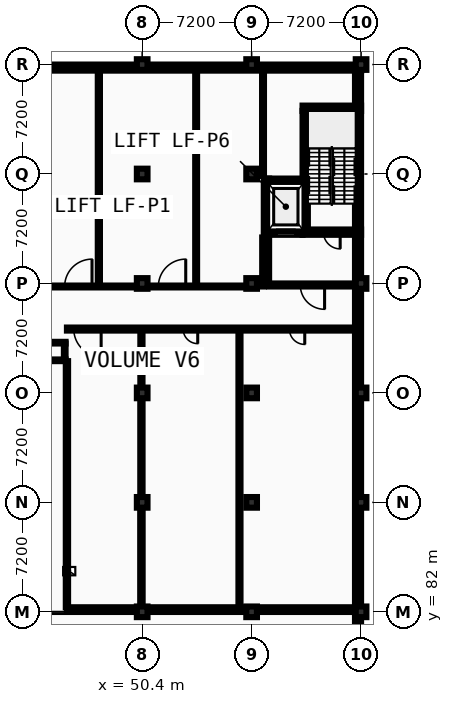
"""IFC4 building model, lengths in metres.
Left out: names, types, materials, properties, quantities, classifications, styles, units other than length and angle.
Written with IfcOpenShell. Run it as: python <this file> out.ifc"""

import sys

from ifc_helpers import new_model, si_unit, direction, frame, frame_2d, origin, origin_2d, place, context, subcontext, project, spatial, rectangle, extrude, element, fill, save


model = new_model("IFC4")
c1 = context("Model", 3, precision=1e-05, world=origin(), true_north=direction((0.0, 1.0)))
c2 = subcontext(c1, "Body", "Model", "MODEL_VIEW")
j1 = project(units=[si_unit("LENGTHUNIT", "METRE"), si_unit("PLANEANGLEUNIT", "RADIAN")], contexts=[c1])
p1 = place(None, origin())
s1 = spatial("IfcSite", under=j1, at=p1, CompositionType="ELEMENT")
p2 = place(p1, origin())
s2 = spatial("IfcBuilding", under=s1, at=p2, CompositionType="ELEMENT")
p3 = place(p2, frame((0.0, 0.0, -4.8)))
s3 = spatial("IfcBuildingStorey", under=s2, at=p3, CompositionType="ELEMENT", Elevation=-4.8)
for number, where, z_axis, x_axis in (
    (1, (50.4, 82.0, 0.0), (0.0, 0.0, 1.0), (1.0, 0.0, 0.0)),
    (2, (50.4, 89.2, 0.0), (0.0, 0.0, 1.0), (1.0, 0.0, 0.0)),
    (3, (50.4, 96.4, 0.0), (0.0, 0.0, 1.0), (1.0, 0.0, 0.0)),
    (4, (50.4, 103.6, 0.0), (0.0, 0.0, 1.0), (1.0, 0.0, 0.0)),
    (5, (50.4, 110.8, 0.0), (0.0, 0.0, 1.0), (1.0, 0.0, 0.0)),
    (6, (50.4, 118.0, 0.0), (0.0, 0.0, 1.0), (1.0, 0.0, 0.0)),
    (7, (57.6, 82.0, 0.0), (0.0, 0.0, 1.0), (1.0, 0.0, 0.0)),
    (8, (57.6, 89.2, 0.0), (0.0, 0.0, 1.0), (1.0, 0.0, 0.0)),
    (9, (57.6, 96.4, 0.0), (0.0, 0.0, 1.0), (1.0, 0.0, 0.0)),
    (10, (57.6, 103.6, 0.0), (0.0, 0.0, 1.0), (1.0, 0.0, 0.0)),
    (11, (57.6, 110.8, 0.0), (0.0, 0.0, 1.0), (1.0, 0.0, 0.0)),
    (12, (57.6, 118.0, 0.0), (0.0, 0.0, 1.0), (1.0, 0.0, 0.0)),
    (13, (64.8, 82.0, 0.0), (0.0, 0.0, 1.0), (1.0, 0.0, 0.0)),
    (14, (64.8, 89.2, 0.0), (0.0, 0.0, 1.0), (1.0, 0.0, 0.0)),
    (15, (64.8, 96.4, 0.0), (0.0, 0.0, 1.0), (1.0, 0.0, 0.0)),
    (16, (64.8, 103.6, 0.0), (0.0, 0.0, 1.0), (1.0, 0.0, 0.0)),
    (17, (64.8, 118.0, 0.0), (0.0, 0.0, 1.0), (1.0, 0.0, 0.0)),
):
    element("IfcColumn", number, at=place(p3, frame(where, z_axis=z_axis, x_axis=x_axis)), inside=s3, PredefinedType="COLUMN", context=c2, shape_type="SweptSolid", body=[
        extrude(rectangle(XDim=0.7, YDim=0.7, at=origin_2d()), origin(), (0.0, 0.0, 1.0), 4.8),
    ])
p4 = place(p3, frame((64.6, 79.2, 0.0), z_axis=(0.0, 0.0, 1.0), x_axis=(0.0, 1.0, 0.0)))
e18 = element("IfcWall", 18, at=p4, inside=s3, PredefinedType="USERDEFINED", context=c2, shape_type="SweptSolid", body=[
    extrude(rectangle(XDim=38.4, YDim=0.4, at=frame_2d((19.2, 0.0))), origin(), (0.0, 0.0, 1.0), 4.545),
])
p5 = place(p3, frame((64.8, 117.8, 0.0), z_axis=(0.0, 0.0, 1.0), x_axis=(-1.0, 0.0, 0.0)))
e19 = element("IfcWall", 19, at=p5, inside=s3, PredefinedType="USERDEFINED", context=c2, shape_type="SweptSolid", body=[
    extrude(rectangle(XDim=28.8, YDim=0.4, at=frame_2d((14.4, 0.0))), origin(), (0.0, 0.0, 1.0), 4.545),
])
p6 = place(p3, frame((60.95, 106.975, 0.0), z_axis=(0.0, 0.0, 1.0), x_axis=(1.0, 0.0, 0.0)))
e20 = element("IfcWall", 20, at=p6, inside=s3, PredefinedType="SHEAR", context=c2, shape_type="SweptSolid", body=[
    extrude(rectangle(XDim=3.85, YDim=0.35, at=frame_2d((1.925, 0.0))), origin(), (0.0, 0.0, 1.0), 4.545),
])
p7 = place(p6, frame((1.375, 0.0, 0.0)))
e21 = element("IfcOpeningElement", 21, at=p7, cuts=e20, PredefinedType="OPENING", context=c2, shape_type="SweptSolid", body=[
    extrude(rectangle(XDim=1.1, YDim=2.15, at=frame_2d((0.55, 1.075))), frame((0.0, 0.185, 0.0), z_axis=(0.0, -1.0, 0.0), x_axis=(1.0, 0.0, 0.0)), (0.0, 0.0, 1.0), 0.37),
])
p8 = place(p3, frame((60.95, 115.125, 0.0), z_axis=(0.0, 0.0, 1.0), x_axis=(1.0, 0.0, 0.0)))
e22 = element("IfcWall", 22, at=p8, inside=s3, PredefinedType="SHEAR", context=c2, shape_type="SweptSolid", body=[
    extrude(rectangle(XDim=3.85, YDim=0.35, at=frame_2d((1.925, 0.0))), origin(), (0.0, 0.0, 1.0), 4.545),
])
p9 = place(p3, frame((61.125, 107.15, 0.0), z_axis=(0.0, 0.0, 1.0), x_axis=(0.0, 1.0, 0.0)))
e23 = element("IfcWall", 23, at=p9, inside=s3, PredefinedType="SHEAR", context=c2, shape_type="SweptSolid", body=[
    extrude(rectangle(XDim=7.8, YDim=0.35, at=frame_2d((3.9, 0.0))), origin(), (0.0, 0.0, 1.0), 4.545),
])
p10 = place(p3, frame((58.75, 106.975, 0.0), z_axis=(0.0, 0.0, 1.0), x_axis=(1.0, 0.0, 0.0)))
e24 = element("IfcWall", 24, at=p10, inside=s3, PredefinedType="SHEAR", context=c2, shape_type="SweptSolid", body=[
    extrude(rectangle(XDim=2.2, YDim=0.35, at=frame_2d((1.1, 0.0))), origin(), (0.0, 0.0, 1.0), 4.545),
])
p11 = place(p10, frame((0.5, 0.0, 0.0)))
e25 = element("IfcOpeningElement", 25, at=p11, cuts=e24, PredefinedType="OPENING", context=c2, shape_type="SweptSolid", body=[
    extrude(rectangle(XDim=1.2, YDim=2.2, at=frame_2d((0.6, 1.1))), frame((0.0, 0.185, 0.0), z_axis=(0.0, -1.0, 0.0), x_axis=(1.0, 0.0, 0.0)), (0.0, 0.0, 1.0), 0.37),
])
p12 = place(p3, frame((58.75, 110.325, 0.0), z_axis=(0.0, 0.0, 1.0), x_axis=(1.0, 0.0, 0.0)))
e26 = element("IfcWall", 26, at=p12, inside=s3, PredefinedType="SHEAR", context=c2, shape_type="SweptSolid", body=[
    extrude(rectangle(XDim=2.2, YDim=0.35, at=frame_2d((1.1, 0.0))), origin(), (0.0, 0.0, 1.0), 4.545),
])
p13 = place(p3, frame((58.575, 106.8, 0.0), z_axis=(0.0, 0.0, 1.0), x_axis=(0.0, 1.0, 0.0)))
e27 = element("IfcWall", 27, at=p13, inside=s3, PredefinedType="SHEAR", context=c2, shape_type="SweptSolid", body=[
    extrude(rectangle(XDim=3.7, YDim=0.35, at=frame_2d((1.85, 0.0))), origin(), (0.0, 0.0, 1.0), 4.545),
])
p14 = place(p3, frame((58.75, 103.5, 0.0), z_axis=(0.0, 0.0, 1.0), x_axis=(1.0, 0.0, 0.0)))
e28 = element("IfcWall", 28, at=p14, inside=s3, PredefinedType="PARTITIONING", context=c2, shape_type="SweptSolid", body=[
    extrude(rectangle(XDim=5.7, YDim=0.2, at=frame_2d((2.85, 0.0))), origin(), (0.0, 0.0, 1.0), 4.095),
])
p15 = place(p14, frame((2.05, 0.0, 0.0)))
e29 = element("IfcOpeningElement", 29, at=p15, cuts=e28, PredefinedType="OPENING", context=c2, shape_type="SweptSolid", body=[
    extrude(rectangle(XDim=1.6, YDim=2.2, at=frame_2d((0.8, 1.1))), frame((0.0, 0.11, 0.0), z_axis=(0.0, -1.0, 0.0), x_axis=(1.0, 0.0, 0.0)), (0.0, 0.0, 1.0), 0.22),
])
p16 = place(p3, frame((58.65, 103.6, 0.0), z_axis=(0.0, 0.0, 1.0), x_axis=(0.0, 1.0, 0.0)))
e30 = element("IfcWall", 30, at=p16, inside=s3, PredefinedType="PARTITIONING", context=c2, shape_type="SweptSolid", body=[
    extrude(rectangle(XDim=3.2, YDim=0.2, at=frame_2d((1.6, 0.0))), origin(), (0.0, 0.0, 1.0), 4.545),
])
for number, where, z_axis, x_axis in (
    (31, (44.09, 98.545, 0.0), (0.0, 0.0, 1.0), (1.0, 0.0, 0.0)),
    (32, (44.09, 99.705, 0.0), (0.0, 0.0, 1.0), (1.0, 0.0, 0.0)),
):
    element("IfcWall", number, at=place(p3, frame(where, z_axis=z_axis, x_axis=x_axis)), inside=s3, PredefinedType="PARTITIONING", context=c2, shape_type="SweptSolid", body=[
        extrude(rectangle(XDim=1.27, YDim=0.11, at=frame_2d((0.635, 0.0))), origin(), (0.0, 0.0, 1.0), 4.54),
    ])
p17 = place(p3, frame((45.305, 98.6, 0.0), z_axis=(0.0, 0.0, 1.0), x_axis=(0.0, 1.0, 0.0)))
e33 = element("IfcWall", 33, at=p17, inside=s3, PredefinedType="PARTITIONING", context=c2, shape_type="SweptSolid", body=[
    extrude(rectangle(XDim=1.05, YDim=0.11, at=frame_2d((0.525, 0.0))), origin(), (0.0, 0.0, 1.0), 4.54),
])
p18 = place(p3, frame((45.45, 82.2, 0.0), z_axis=(0.0, 0.0, 1.0), x_axis=(1.0, 0.0, 0.0)))
e34 = element("IfcWall", 34, at=p18, inside=s3, PredefinedType="PARTITIONING", context=c2, shape_type="SweptSolid", body=[
    extrude(rectangle(XDim=4.57, YDim=0.2, at=frame_2d((2.285, 0.0))), origin(), (0.0, 0.0, 1.0), 4.095),
])
p19 = place(p3, frame((50.78, 82.2, 0.0), z_axis=(0.0, 0.0, 1.0), x_axis=(1.0, 0.0, 0.0)))
e35 = element("IfcWall", 35, at=p19, inside=s3, PredefinedType="PARTITIONING", context=c2, shape_type="SweptSolid", body=[
    extrude(rectangle(XDim=6.44, YDim=0.2, at=frame_2d((3.22, 0.0))), origin(), (0.0, 0.0, 1.0), 4.095),
])
p20 = place(p3, frame((57.98, 82.2, 0.0), z_axis=(0.0, 0.0, 1.0), x_axis=(1.0, 0.0, 0.0)))
e36 = element("IfcWall", 36, at=p20, inside=s3, PredefinedType="PARTITIONING", context=c2, shape_type="SweptSolid", body=[
    extrude(rectangle(XDim=6.4, YDim=0.2, at=frame_2d((3.2, 0.0))), origin(), (0.0, 0.0, 1.0), 4.095),
])
p21 = place(p3, frame((45.45, 100.6, 0.0), z_axis=(0.0, 0.0, 1.0), x_axis=(1.0, 0.0, 0.0)))
e37 = element("IfcWall", 37, at=p21, inside=s3, PredefinedType="PARTITIONING", context=c2, shape_type="SweptSolid", body=[
    extrude(rectangle(XDim=18.93, YDim=0.2, at=frame_2d((9.465, 0.0))), origin(), (0.0, 0.0, 1.0), 4.545),
])
p22 = place(p21, frame((0.45, 0.0, 0.0)))
e38 = element("IfcOpeningElement", 38, at=p22, cuts=e37, PredefinedType="OPENING", context=c2, shape_type="SweptSolid", body=[
    extrude(rectangle(XDim=1.8, YDim=2.3, at=frame_2d((0.9, 1.15))), frame((0.0, 0.11, 0.0), z_axis=(0.0, -1.0, 0.0), x_axis=(1.0, 0.0, 0.0)), (0.0, 0.0, 1.0), 0.22),
])
p23 = place(p21, frame((7.646, 0.0, 0.0)))
e39 = element("IfcOpeningElement", 39, at=p23, cuts=e37, PredefinedType="OPENING", context=c2, shape_type="SweptSolid", body=[
    extrude(rectangle(XDim=0.958, YDim=2.068, at=frame_2d((0.479, 1.034))), frame((0.0, 0.11, 0.0), z_axis=(0.0, -1.0, 0.0), x_axis=(1.0, 0.0, 0.0)), (0.0, 0.0, 1.0), 0.22),
])
p24 = place(p21, frame((14.635, 0.0, 0.0)))
e40 = element("IfcOpeningElement", 40, at=p24, cuts=e37, PredefinedType="OPENING", context=c2, shape_type="SweptSolid", body=[
    extrude(rectangle(XDim=1.01, YDim=2.068, at=frame_2d((0.505, 1.034))), frame((0.0, 0.11, 0.0), z_axis=(0.0, -1.0, 0.0), x_axis=(1.0, 0.0, 0.0)), (0.0, 0.0, 1.0), 0.22),
])
p25 = place(p3, frame((43.58, 103.4, 0.0), z_axis=(0.0, 0.0, 1.0), x_axis=(1.0, 0.0, 0.0)))
e41 = element("IfcWall", 41, at=p25, inside=s3, PredefinedType="PARTITIONING", context=c2, shape_type="SweptSolid", body=[
    extrude(rectangle(XDim=6.44, YDim=0.125, at=frame_2d((3.22, 0.0))), origin(), (0.0, 0.0, 1.0), 4.095),
])
p26 = place(p25, frame((1.72, 0.0, 0.0)))
e42 = element("IfcOpeningElement", 42, at=p26, cuts=e41, PredefinedType="OPENING", context=c2, shape_type="SweptSolid", body=[
    extrude(rectangle(XDim=1.8, YDim=2.3, at=frame_2d((0.9, 1.15))), frame((0.0, 0.073, 0.0), z_axis=(0.0, -1.0, 0.0), x_axis=(1.0, 0.0, 0.0)), (0.0, 0.0, 1.0), 0.145),
])
p27 = place(p3, frame((50.78, 103.4, 0.0), z_axis=(0.0, 0.0, 1.0), x_axis=(1.0, 0.0, 0.0)))
e43 = element("IfcWall", 43, at=p27, inside=s3, PredefinedType="PARTITIONING", context=c2, shape_type="SweptSolid", body=[
    extrude(rectangle(XDim=6.44, YDim=0.125, at=frame_2d((3.22, 0.0))), origin(), (0.0, 0.0, 1.0), 4.095),
])
p28 = place(p27, frame((3.62, 0.0, 0.0)))
e44 = element("IfcOpeningElement", 44, at=p28, cuts=e43, PredefinedType="OPENING", context=c2, shape_type="SweptSolid", body=[
    extrude(rectangle(XDim=1.0, YDim=2.1, at=frame_2d((0.5, 1.05))), frame((0.0, 0.073, 0.0), z_axis=(0.0, -1.0, 0.0), x_axis=(1.0, 0.0, 0.0)), (0.0, 0.0, 1.0), 0.145),
])
p29 = place(p27, frame((0.685, 0.0, 0.0)))
e45 = element("IfcOpeningElement", 45, at=p29, cuts=e43, PredefinedType="OPENING", context=c2, shape_type="SweptSolid", body=[
    extrude(rectangle(XDim=1.8, YDim=2.3, at=frame_2d((0.9, 1.15))), frame((0.0, 0.073, 0.0), z_axis=(0.0, -1.0, 0.0), x_axis=(1.0, 0.0, 0.0)), (0.0, 0.0, 1.0), 0.145),
])
p30 = place(p3, frame((45.45, 82.3, 0.0), z_axis=(0.0, 0.0, 1.0), x_axis=(0.0, 1.0, 0.0)))
e46 = element("IfcWall", 46, at=p30, inside=s3, PredefinedType="PARTITIONING", context=c2, shape_type="SweptSolid", body=[
    extrude(rectangle(XDim=16.19, YDim=0.15, at=frame_2d((8.095, 0.0))), origin(), (0.0, 0.0, 1.0), 4.235),
])
p31 = place(p3, frame((47.55, 103.462, 0.0), z_axis=(0.0, 0.0, 1.0), x_axis=(0.0, 1.0, 0.0)))
e47 = element("IfcWall", 47, at=p31, inside=s3, PredefinedType="PARTITIONING", context=c2, shape_type="SweptSolid", body=[
    extrude(rectangle(XDim=14.138, YDim=0.142, at=frame_2d((7.069, 0.0))), origin(), (0.0, 0.0, 1.0), 4.545),
])
p32 = place(p3, frame((50.35, 82.38, 0.0), z_axis=(0.0, 0.0, 1.0), x_axis=(0.0, 1.0, 0.0)))
e48 = element("IfcWall", 48, at=p32, inside=s3, PredefinedType="PARTITIONING", context=c2, shape_type="SweptSolid", body=[
    extrude(rectangle(XDim=6.44, YDim=0.16, at=frame_2d((3.22, 0.0))), origin(), (0.0, 0.0, 1.0), 4.245),
])
p33 = place(p3, frame((50.35, 89.58, 0.0), z_axis=(0.0, 0.0, 1.0), x_axis=(0.0, 1.0, 0.0)))
e49 = element("IfcWall", 49, at=p33, inside=s3, PredefinedType="PARTITIONING", context=c2, shape_type="SweptSolid", body=[
    extrude(rectangle(XDim=6.44, YDim=0.15, at=frame_2d((3.22, 0.0))), origin(), (0.0, 0.0, 1.0), 4.245),
])
p34 = place(p3, frame((50.35, 96.78, 0.0), z_axis=(0.0, 0.0, 1.0), x_axis=(0.0, 1.0, 0.0)))
e50 = element("IfcWall", 50, at=p34, inside=s3, PredefinedType="PARTITIONING", context=c2, shape_type="SweptSolid", body=[
    extrude(rectangle(XDim=3.72, YDim=0.142, at=frame_2d((1.86, 0.0))), origin(), (0.0, 0.0, 1.0), 4.245),
])
p35 = place(p3, frame((53.95, 103.462, 0.0), z_axis=(0.0, 0.0, 1.0), x_axis=(0.0, 1.0, 0.0)))
e51 = element("IfcWall", 51, at=p35, inside=s3, PredefinedType="PARTITIONING", context=c2, shape_type="SweptSolid", body=[
    extrude(rectangle(XDim=14.138, YDim=0.125, at=frame_2d((7.069, 0.0))), origin(), (0.0, 0.0, 1.0), 4.545),
])
p36 = place(p3, frame((56.8, 82.3, 0.0), z_axis=(0.0, 0.0, 1.0), x_axis=(0.0, 1.0, 0.0)))
e52 = element("IfcWall", 52, at=p36, inside=s3, PredefinedType="PARTITIONING", context=c2, shape_type="SweptSolid", body=[
    extrude(rectangle(XDim=18.2, YDim=0.135, at=frame_2d((9.1, 0.0))), origin(), (0.0, 0.0, 1.0), 4.545),
])
p37 = place(p3, frame((58.35, 103.4, 0.0), z_axis=(0.0, 0.0, 1.0), x_axis=(0.0, 1.0, 0.0)))
e53 = element("IfcWall", 53, at=p37, inside=s3, PredefinedType="PARTITIONING", context=c2, shape_type="SweptSolid", body=[
    extrude(rectangle(XDim=3.225, YDim=0.11, at=frame_2d((1.613, 0.0))), origin(), (0.0, 0.0, 1.0), 4.545),
])
p38 = place(p3, frame((58.35, 110.675, 0.0), z_axis=(0.0, 0.0, 1.0), x_axis=(0.0, 1.0, 0.0)))
e54 = element("IfcWall", 54, at=p38, inside=s3, PredefinedType="PARTITIONING", context=c2, shape_type="SweptSolid", body=[
    extrude(rectangle(XDim=6.925, YDim=0.125, at=frame_2d((3.462, 0.0))), origin(), (0.0, 0.0, 1.0), 4.545),
])
p39 = place(p7, origin())
e55 = element("IfcDoor", 55, at=p39, inside=s3, OperationType="SINGLE_SWING_RIGHT", PredefinedType="DOOR", context=c2, shape_type="SweptSolid", body=[
    extrude(rectangle(XDim=1.1, YDim=2.15, at=frame_2d((0.55, 1.075))), frame((0.0, 0.025, 0.0), z_axis=(0.0, -1.0, 0.0), x_axis=(1.0, 0.0, 0.0)), (0.0, 0.0, 1.0), 0.05),
])
fill(e21, e55)
p40 = place(p11, origin())
e56 = element("IfcDoor", 56, at=p40, inside=s3, OperationType="SLIDING_TO_RIGHT", PredefinedType="DOOR", context=c2, shape_type="SweptSolid", body=[
    extrude(rectangle(XDim=1.2, YDim=2.2, at=frame_2d((0.6, 1.1))), frame((0.0, 0.025, 0.0), z_axis=(0.0, -1.0, 0.0), x_axis=(1.0, 0.0, 0.0)), (0.0, 0.0, 1.0), 0.05),
])
fill(e25, e56)
p41 = place(p15, origin())
e57 = element("IfcDoor", 57, at=p41, inside=s3, OperationType="DOUBLE_DOOR_SINGLE_SWING", PredefinedType="DOOR", context=c2, shape_type="SweptSolid", body=[
    extrude(rectangle(XDim=1.6, YDim=2.2, at=frame_2d((0.8, 1.1))), frame((0.0, 0.025, 0.0), z_axis=(0.0, -1.0, 0.0), x_axis=(1.0, 0.0, 0.0)), (0.0, 0.0, 1.0), 0.05),
])
fill(e29, e57)
p42 = place(p28, frame((1.0, 0.0, 0.0), z_axis=(0.0, 0.0, 1.0), x_axis=(-1.0, 0.0, 0.0)))
e58 = element("IfcDoor", 58, at=p42, inside=s3, OperationType="SLIDING_TO_LEFT", PredefinedType="DOOR", context=c2, shape_type="SweptSolid", body=[
    extrude(rectangle(XDim=1.0, YDim=2.1, at=frame_2d((0.5, 1.05))), frame((0.0, 0.025, 0.0), z_axis=(0.0, -1.0, 0.0), x_axis=(1.0, 0.0, 0.0)), (0.0, 0.0, 1.0), 0.05),
])
fill(e44, e58)
p43 = place(p26, frame((1.8, 0.0, 0.0), z_axis=(0.0, 0.0, 1.0), x_axis=(-1.0, 0.0, 0.0)))
e59 = element("IfcDoor", 59, at=p43, inside=s3, OperationType="DOUBLE_DOOR_SINGLE_SWING", PredefinedType="DOOR", context=c2, shape_type="SweptSolid", body=[
    extrude(rectangle(XDim=1.8, YDim=2.3, at=frame_2d((0.9, 1.15))), frame((0.0, 0.025, 0.0), z_axis=(0.0, -1.0, 0.0), x_axis=(1.0, 0.0, 0.0)), (0.0, 0.0, 1.0), 0.05),
])
fill(e42, e59)
p44 = place(p22, origin())
e60 = element("IfcDoor", 60, at=p44, inside=s3, OperationType="DOUBLE_DOOR_SINGLE_SWING", PredefinedType="DOOR", context=c2, shape_type="SweptSolid", body=[
    extrude(rectangle(XDim=1.8, YDim=2.3, at=frame_2d((0.9, 1.15))), frame((0.0, 0.025, 0.0), z_axis=(0.0, -1.0, 0.0), x_axis=(1.0, 0.0, 0.0)), (0.0, 0.0, 1.0), 0.05),
])
fill(e38, e60)
p45 = place(p29, frame((1.8, 0.0, 0.0), z_axis=(0.0, 0.0, 1.0), x_axis=(-1.0, 0.0, 0.0)))
e61 = element("IfcDoor", 61, at=p45, inside=s3, OperationType="DOUBLE_DOOR_SINGLE_SWING", PredefinedType="DOOR", context=c2, shape_type="SweptSolid", body=[
    extrude(rectangle(XDim=1.8, YDim=2.3, at=frame_2d((0.9, 1.15))), frame((0.0, 0.025, 0.0), z_axis=(0.0, -1.0, 0.0), x_axis=(1.0, 0.0, 0.0)), (0.0, 0.0, 1.0), 0.05),
])
fill(e45, e61)
p46 = place(p23, origin())
e62 = element("IfcDoor", 62, at=p46, inside=s3, OperationType="SINGLE_SWING_RIGHT", PredefinedType="DOOR", context=c2, shape_type="SweptSolid", body=[
    extrude(rectangle(XDim=0.958, YDim=2.068, at=frame_2d((0.479, 1.034))), frame((0.0, 0.025, 0.0), z_axis=(0.0, -1.0, 0.0), x_axis=(1.0, 0.0, 0.0)), (0.0, 0.0, 1.0), 0.05),
])
fill(e39, e62)
p47 = place(p24, origin())
e63 = element("IfcDoor", 63, at=p47, inside=s3, OperationType="SINGLE_SWING_RIGHT", PredefinedType="DOOR", context=c2, shape_type="SweptSolid", body=[
    extrude(rectangle(XDim=1.01, YDim=2.068, at=frame_2d((0.505, 1.034))), frame((0.0, 0.025, 0.0), z_axis=(0.0, -1.0, 0.0), x_axis=(1.0, 0.0, 0.0)), (0.0, 0.0, 1.0), 0.05),
])
fill(e40, e63)
save(model, sys.argv[1])
